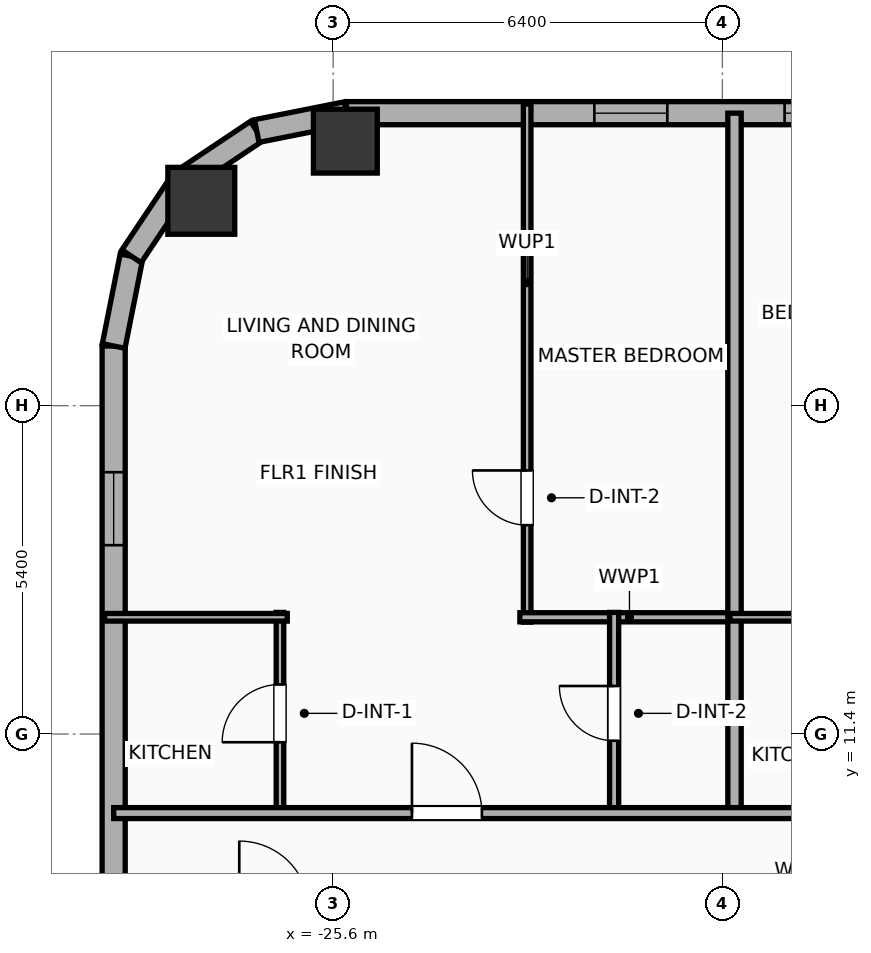
"""IFC4 building model, lengths in metres.
Left out: names, types, materials, properties, quantities, classifications, styles, units other than length and angle.
Written with IfcOpenShell. Run it as: python <this file> out.ifc"""

import sys

from ifc_helpers import new_model, si_unit, direction, frame, frame_2d, origin, origin_2d, place, context, subcontext, project, spatial, rectangle, hollow_rectangle, hollow_circle, extrude, element, fill, save


model = new_model("IFC4")
c1 = context("Model", 3, precision=1e-05, world=origin(), true_north=direction((0.0, 1.0)))
c2 = subcontext(c1, "Body", "Model", "MODEL_VIEW")
j1 = project(units=[si_unit("LENGTHUNIT", "METRE"), si_unit("PLANEANGLEUNIT", "RADIAN")], contexts=[c1])
p1 = place(None, origin())
s1 = spatial("IfcSite", under=j1, at=p1, CompositionType="ELEMENT")
p2 = place(p1, origin())
s2 = spatial("IfcBuilding", under=s1, at=p2, CompositionType="ELEMENT")
p3 = place(p2, frame((0.0, 0.0, 101.4)))
s3 = spatial("IfcBuildingStorey", under=s2, at=p3, CompositionType="ELEMENT", Elevation=101.4)
p4 = place(p3, frame((-25.4, 21.15, 0.0), z_axis=(0.0, 0.0, 1.0), x_axis=(1.0, 0.0, 0.0)))
e1 = element("IfcColumn", 1, at=p4, inside=s3, PredefinedType="COLUMN", context=c2, shape_type="SweptSolid", body=[
    extrude(hollow_rectangle(XDim=1.05, YDim=1.05, WallThickness=0.036, at=origin_2d()), origin(), (0.0, 0.0, 1.0), 3.9),
])
p5 = place(p3, frame((-27.769, 20.169, 0.0), z_axis=(0.0, 0.0, 1.0), x_axis=(1.0, 0.0, 0.0)))
e2 = element("IfcColumn", 2, at=p5, inside=s3, PredefinedType="COLUMN", context=c2, shape_type="SweptSolid", body=[
    extrude(hollow_circle(Radius=0.55, WallThickness=0.036, at=origin_2d()), origin(), (0.0, 0.0, 1.0), 3.9),
])
p6 = place(p3, frame((-29.21, -16.581, 0.0), z_axis=(0.0, 0.0, 1.0), x_axis=(0.0, 1.0, 0.0)))
e3 = element("IfcWall", 3, at=p6, inside=s3, PredefinedType="ELEMENTEDWALL", context=c2, shape_type="SweptSolid", body=[
    extrude(rectangle(XDim=34.363, YDim=0.38, at=frame_2d((17.181, 0.0))), origin(), (0.0, 0.0, 1.0), 3.65),
])
p7 = place(p6, frame((31.087, 0.0, 0.75)))
e4 = element("IfcOpeningElement", 4, at=p7, cuts=e3, PredefinedType="OPENING", context=c2, shape_type="SweptSolid", body=[
    extrude(rectangle(XDim=1.2, YDim=2.05, at=frame_2d((0.6, 1.025))), frame((0.0, 0.2, 0.0), z_axis=(0.0, -1.0, 0.0), x_axis=(1.0, 0.0, 0.0)), (0.0, 0.0, 1.0), 0.4),
])
p8 = place(p6, frame((21.626, 0.0, 0.75)))
e5 = element("IfcOpeningElement", 5, at=p8, cuts=e3, PredefinedType="OPENING", context=c2, shape_type="SweptSolid", body=[
    extrude(rectangle(XDim=1.2, YDim=2.05, at=frame_2d((0.6, 1.025))), frame((0.0, 0.2, 0.0), z_axis=(0.0, -1.0, 0.0), x_axis=(1.0, 0.0, 0.0)), (0.0, 0.0, 1.0), 0.4),
])
p9 = place(p6, frame((10.551, 0.0, 0.75)))
e6 = element("IfcOpeningElement", 6, at=p9, cuts=e3, PredefinedType="OPENING", context=c2, shape_type="SweptSolid", body=[
    extrude(rectangle(XDim=1.2, YDim=2.05, at=frame_2d((0.6, 1.025))), frame((0.0, 0.2, 0.0), z_axis=(0.0, -1.0, 0.0), x_axis=(1.0, 0.0, 0.0)), (0.0, 0.0, 1.0), 0.4),
])
p10 = place(p3, frame((-29.21, 17.781, 0.0), z_axis=(0.0, 0.0, 1.0), x_axis=(0.195086038585, 0.980786132421, 0.0)))
e7 = element("IfcWall", 7, at=p10, inside=s3, PredefinedType="ELEMENTEDWALL", context=c2, shape_type="SweptSolid", body=[
    extrude(rectangle(XDim=1.504, YDim=0.38, at=frame_2d((0.752, 0.0))), origin(), (0.0, 0.0, 1.0), 3.65),
])
p11 = place(p3, frame((-28.917, 19.257, 0.0), z_axis=(0.0, 0.0, 1.0), x_axis=(0.555610286119, 0.831442848281, 0.0)))
e8 = element("IfcWall", 8, at=p11, inside=s3, PredefinedType="ELEMENTEDWALL", context=c2, shape_type="SweptSolid", body=[
    extrude(rectangle(XDim=1.485, YDim=0.38, at=frame_2d((0.743, 0.0))), origin(), (0.0, 0.0, 1.0), 3.65),
])
p12 = place(p3, frame((-28.091, 20.491, 0.0), z_axis=(0.0, 0.0, 1.0), x_axis=(0.831468045563, 0.555572577804, 0.0)))
e9 = element("IfcWall", 9, at=p12, inside=s3, PredefinedType="ELEMENTEDWALL", context=c2, shape_type="SweptSolid", body=[
    extrude(rectangle(XDim=1.485, YDim=0.38, at=frame_2d((0.742, 0.0))), origin(), (0.0, 0.0, 1.0), 3.65),
])
p13 = place(p3, frame((-26.857, 21.316, 0.0), z_axis=(0.0, 0.0, 1.0), x_axis=(0.980755066645, 0.195242155415, 0.0)))
e10 = element("IfcWall", 10, at=p13, inside=s3, PredefinedType="ELEMENTEDWALL", context=c2, shape_type="SweptSolid", body=[
    extrude(rectangle(XDim=1.504, YDim=0.38, at=frame_2d((0.752, 0.0))), origin(), (0.0, 0.0, 1.0), 3.65),
])
p14 = place(p3, frame((-25.381, 21.61, 0.0), z_axis=(0.0, 0.0, 1.0), x_axis=(1.0, 0.0, 0.0)))
e11 = element("IfcWall", 11, at=p14, inside=s3, PredefinedType="ELEMENTEDWALL", context=c2, shape_type="SweptSolid", body=[
    extrude(rectangle(XDim=54.763, YDim=0.38, at=frame_2d((27.381, 0.0))), origin(), (0.0, 0.0, 1.0), 3.65),
])
p15 = place(p14, frame((45.067, 0.0, 0.75)))
e12 = element("IfcOpeningElement", 12, at=p15, cuts=e11, PredefinedType="OPENING", context=c2, shape_type="SweptSolid", body=[
    extrude(rectangle(XDim=2.4, YDim=2.1, at=frame_2d((1.2, 1.05))), frame((0.0, 0.2, 0.0), z_axis=(0.0, -1.0, 0.0), x_axis=(1.0, 0.0, 0.0)), (0.0, 0.0, 1.0), 0.4),
])
p16 = place(p14, frame((4.076, 0.0, 0.75)))
e13 = element("IfcOpeningElement", 13, at=p16, cuts=e11, PredefinedType="OPENING", context=c2, shape_type="SweptSolid", body=[
    extrude(rectangle(XDim=1.2, YDim=2.05, at=frame_2d((0.6, 1.025))), frame((0.0, 0.2, 0.0), z_axis=(0.0, -1.0, 0.0), x_axis=(1.0, 0.0, 0.0)), (0.0, 0.0, 1.0), 0.4),
])
p17 = place(p14, frame((9.395, 0.0, 0.75)))
e14 = element("IfcOpeningElement", 14, at=p17, cuts=e11, PredefinedType="OPENING", context=c2, shape_type="SweptSolid", body=[
    extrude(rectangle(XDim=0.85, YDim=2.05, at=frame_2d((0.425, 1.025))), frame((0.0, 0.2, 0.0), z_axis=(0.0, -1.0, 0.0), x_axis=(1.0, 0.0, 0.0)), (0.0, 0.0, 1.0), 0.4),
])
p18 = place(p14, frame((7.205, 0.0, 0.75)))
e15 = element("IfcOpeningElement", 15, at=p18, cuts=e11, PredefinedType="OPENING", context=c2, shape_type="SweptSolid", body=[
    extrude(rectangle(XDim=1.2, YDim=2.05, at=frame_2d((0.6, 1.025))), frame((0.0, 0.2, 0.0), z_axis=(0.0, -1.0, 0.0), x_axis=(1.0, 0.0, 0.0)), (0.0, 0.0, 1.0), 0.4),
])
p19 = place(p14, frame((13.676, 0.0, 0.75)))
e16 = element("IfcOpeningElement", 16, at=p19, cuts=e11, PredefinedType="OPENING", context=c2, shape_type="SweptSolid", body=[
    extrude(rectangle(XDim=1.2, YDim=2.05, at=frame_2d((0.6, 1.025))), frame((0.0, 0.2, 0.0), z_axis=(0.0, -1.0, 0.0), x_axis=(1.0, 0.0, 0.0)), (0.0, 0.0, 1.0), 0.4),
])
p20 = place(p14, frame((17.136, 0.0, 0.75)))
e17 = element("IfcOpeningElement", 17, at=p20, cuts=e11, PredefinedType="OPENING", context=c2, shape_type="SweptSolid", body=[
    extrude(rectangle(XDim=1.2, YDim=2.05, at=frame_2d((0.6, 1.025))), frame((0.0, 0.2, 0.0), z_axis=(0.0, -1.0, 0.0), x_axis=(1.0, 0.0, 0.0)), (0.0, 0.0, 1.0), 0.4),
])
p21 = place(p14, frame((22.656, 0.0, 0.75)))
e18 = element("IfcOpeningElement", 18, at=p21, cuts=e11, PredefinedType="OPENING", context=c2, shape_type="SweptSolid", body=[
    extrude(rectangle(XDim=1.2, YDim=2.05, at=frame_2d((0.6, 1.025))), frame((0.0, 0.2, 0.0), z_axis=(0.0, -1.0, 0.0), x_axis=(1.0, 0.0, 0.0)), (0.0, 0.0, 1.0), 0.4),
])
p22 = place(p14, frame((29.443, 0.0, 0.75)))
e19 = element("IfcOpeningElement", 19, at=p22, cuts=e11, PredefinedType="OPENING", context=c2, shape_type="SweptSolid", body=[
    extrude(rectangle(XDim=1.2, YDim=2.05, at=frame_2d((0.6, 1.025))), frame((0.0, 0.2, 0.0), z_axis=(0.0, -1.0, 0.0), x_axis=(1.0, 0.0, 0.0)), (0.0, 0.0, 1.0), 0.4),
])
p23 = place(p14, frame((26.348, 0.0, 0.75)))
e20 = element("IfcOpeningElement", 20, at=p23, cuts=e11, PredefinedType="OPENING", context=c2, shape_type="SweptSolid", body=[
    extrude(rectangle(XDim=1.2, YDim=2.05, at=frame_2d((0.6, 1.025))), frame((0.0, 0.2, 0.0), z_axis=(0.0, -1.0, 0.0), x_axis=(1.0, 0.0, 0.0)), (0.0, 0.0, 1.0), 0.4),
])
p24 = place(p14, frame((33.596, 0.0, 0.75)))
e21 = element("IfcOpeningElement", 21, at=p24, cuts=e11, PredefinedType="OPENING", context=c2, shape_type="SweptSolid", body=[
    extrude(rectangle(XDim=1.2, YDim=2.05, at=frame_2d((0.6, 1.025))), frame((0.0, 0.2, 0.0), z_axis=(0.0, -1.0, 0.0), x_axis=(1.0, 0.0, 0.0)), (0.0, 0.0, 1.0), 0.4),
])
p25 = place(p14, frame((36.014, 0.0, 0.75)))
e22 = element("IfcOpeningElement", 22, at=p25, cuts=e11, PredefinedType="OPENING", context=c2, shape_type="SweptSolid", body=[
    extrude(rectangle(XDim=1.2, YDim=2.05, at=frame_2d((0.6, 1.025))), frame((0.0, 0.2, 0.0), z_axis=(0.0, -1.0, 0.0), x_axis=(1.0, 0.0, 0.0)), (0.0, 0.0, 1.0), 0.4),
])
p26 = place(p14, frame((40.814, 0.0, 0.75)))
e23 = element("IfcOpeningElement", 23, at=p26, cuts=e11, PredefinedType="OPENING", context=c2, shape_type="SweptSolid", body=[
    extrude(rectangle(XDim=1.2, YDim=2.05, at=frame_2d((0.6, 1.025))), frame((0.0, 0.2, 0.0), z_axis=(0.0, -1.0, 0.0), x_axis=(1.0, 0.0, 0.0)), (0.0, 0.0, 1.0), 0.4),
])
p27 = place(p14, frame((49.385, 0.0, 0.75)))
e24 = element("IfcOpeningElement", 24, at=p27, cuts=e11, PredefinedType="OPENING", context=c2, shape_type="SweptSolid", body=[
    extrude(rectangle(XDim=1.2, YDim=2.05, at=frame_2d((0.6, 1.025))), frame((0.0, 0.2, 0.0), z_axis=(0.0, -1.0, 0.0), x_axis=(1.0, 0.0, 0.0)), (0.0, 0.0, 1.0), 0.4),
])
p28 = place(p14, frame((52.181, 0.0, 0.75)))
e25 = element("IfcOpeningElement", 25, at=p28, cuts=e11, PredefinedType="OPENING", context=c2, shape_type="SweptSolid", body=[
    extrude(rectangle(XDim=1.2, YDim=2.05, at=frame_2d((0.6, 1.025))), frame((0.0, 0.2, 0.0), z_axis=(0.0, -1.0, 0.0), x_axis=(1.0, 0.0, 0.0)), (0.0, 0.0, 1.0), 0.4),
])
p29 = place(p3, frame((-22.41, 13.24, 0.0), z_axis=(0.0, 0.0, 1.0), x_axis=(0.0, 1.0, 0.0)))
e26 = element("IfcWall", 26, at=p29, inside=s3, PredefinedType="PARTITIONING", context=c2, shape_type="SweptSolid", body=[
    extrude(rectangle(XDim=8.52, YDim=0.125, at=frame_2d((4.26, 0.0))), origin(), (0.0, 0.0, 1.0), 3.65),
])
p30 = place(p29, frame((1.595, 0.0, 0.0)))
e27 = element("IfcOpeningElement", 27, at=p30, cuts=e26, PredefinedType="OPENING", context=c2, shape_type="SweptSolid", body=[
    extrude(rectangle(XDim=0.9, YDim=2.05, at=frame_2d((0.45, 1.025))), frame((0.0, 0.073, 0.0), z_axis=(0.0, -1.0, 0.0), x_axis=(1.0, 0.0, 0.0)), (0.0, 0.0, 1.0), 0.145),
])
p31 = place(p3, frame((-22.53, 13.32, 0.0), z_axis=(0.0, 0.0, 1.0), x_axis=(1.0, 0.0, 0.0)))
e28 = element("IfcWall", 28, at=p31, inside=s3, PredefinedType="PLUMBINGWALL", context=c2, shape_type="SweptSolid", body=[
    extrude(rectangle(XDim=3.605, YDim=0.15, at=frame_2d((1.802, 0.0))), origin(), (0.0, 0.0, 1.0), 3.65),
])
p32 = place(p3, frame((-26.475, 10.08, 0.0), z_axis=(0.0, 0.0, 1.0), x_axis=(0.0, 1.0, 0.0)))
e29 = element("IfcWall", 29, at=p32, inside=s3, PredefinedType="PARTITIONING", context=c2, shape_type="SweptSolid", body=[
    extrude(rectangle(XDim=3.32, YDim=0.125, at=frame_2d((1.66, 0.0))), origin(), (0.0, 0.0, 1.0), 3.65),
])
p33 = place(p32, frame((1.185, 0.0, 0.0)))
e30 = element("IfcOpeningElement", 30, at=p33, cuts=e29, PredefinedType="OPENING", context=c2, shape_type="SweptSolid", body=[
    extrude(rectangle(XDim=0.95, YDim=2.05, at=frame_2d((0.475, 1.025))), frame((0.0, 0.073, 0.0), z_axis=(0.0, -1.0, 0.0), x_axis=(1.0, 0.0, 0.0)), (0.0, 0.0, 1.0), 0.145),
])
p34 = place(p3, frame((-29.36, 13.32, 0.0), z_axis=(0.0, 0.0, 1.0), x_axis=(1.0, 0.0, 0.0)))
e31 = element("IfcWall", 31, at=p34, inside=s3, PredefinedType="PARTITIONING", context=c2, shape_type="SweptSolid", body=[
    extrude(rectangle(XDim=3.005, YDim=0.125, at=frame_2d((1.502, 0.0))), origin(), (0.0, 0.0, 1.0), 3.65),
])
p35 = place(p3, frame((-20.98, 10.08, 0.0), z_axis=(0.0, 0.0, 1.0), x_axis=(0.0, 1.0, 0.0)))
e32 = element("IfcWall", 32, at=p35, inside=s3, PredefinedType="PLUMBINGWALL", context=c2, shape_type="SweptSolid", body=[
    extrude(rectangle(XDim=3.32, YDim=0.15, at=frame_2d((1.66, 0.0))), origin(), (0.0, 0.0, 1.0), 3.65),
])
p36 = place(p35, frame((1.21, 0.0, 0.0)))
e33 = element("IfcOpeningElement", 33, at=p36, cuts=e32, PredefinedType="OPENING", context=c2, shape_type="SweptSolid", body=[
    extrude(rectangle(XDim=0.9, YDim=2.05, at=frame_2d((0.45, 1.025))), frame((0.0, 0.085, 0.0), z_axis=(0.0, -1.0, 0.0), x_axis=(1.0, 0.0, 0.0)), (0.0, 0.0, 1.0), 0.17),
])
p37 = place(p3, frame((-19.0, 10.02, 0.0), z_axis=(0.0, 0.0, 1.0), x_axis=(0.0, 1.0, 0.0)))
e34 = element("IfcWall", 34, at=p37, inside=s3, PredefinedType="PARTITIONING", context=c2, shape_type="SweptSolid", body=[
    extrude(rectangle(XDim=11.59, YDim=0.22, at=frame_2d((5.795, 0.0))), origin(), (0.0, 0.0, 1.0), 3.65),
])
p38 = place(p3, frame((-19.075, 13.32, 0.0), z_axis=(0.0, 0.0, 1.0), x_axis=(1.0, 0.0, 0.0)))
e35 = element("IfcWall", 35, at=p38, inside=s3, PredefinedType="PARTITIONING", context=c2, shape_type="SweptSolid", body=[
    extrude(rectangle(XDim=3.042, YDim=0.125, at=frame_2d((1.521, 0.0))), origin(), (0.0, 0.0, 1.0), 3.65),
])
p39 = place(p3, frame((-29.21, 10.1, 0.0), z_axis=(0.0, 0.0, 1.0), x_axis=(1.0, 0.0, 0.0)))
e36 = element("IfcWall", 36, at=p39, inside=s3, PredefinedType="PARTITIONING", context=c2, shape_type="SweptSolid", body=[
    extrude(rectangle(XDim=62.42, YDim=0.18, at=frame_2d((31.21, 0.0))), origin(), (0.0, 0.0, 1.0), 3.65),
])
p40 = place(p39, frame((4.906, 0.0, 0.0)))
e37 = element("IfcOpeningElement", 37, at=p40, cuts=e36, PredefinedType="OPENING", context=c2, shape_type="SweptSolid", body=[
    extrude(rectangle(XDim=1.15, YDim=2.05, at=frame_2d((0.575, 1.025))), frame((0.0, 0.1, 0.0), z_axis=(0.0, -1.0, 0.0), x_axis=(1.0, 0.0, 0.0)), (0.0, 0.0, 1.0), 0.2),
])
p41 = place(p39, frame((14.812, 0.0, 0.0)))
e38 = element("IfcOpeningElement", 38, at=p41, cuts=e36, PredefinedType="OPENING", context=c2, shape_type="SweptSolid", body=[
    extrude(rectangle(XDim=1.15, YDim=2.05, at=frame_2d((0.575, 1.025))), frame((0.0, 0.1, 0.0), z_axis=(0.0, -1.0, 0.0), x_axis=(1.0, 0.0, 0.0)), (0.0, 0.0, 1.0), 0.2),
])
p42 = place(p39, frame((24.406, 0.0, 0.0)))
e39 = element("IfcOpeningElement", 39, at=p42, cuts=e36, PredefinedType="OPENING", context=c2, shape_type="SweptSolid", body=[
    extrude(rectangle(XDim=1.15, YDim=2.05, at=frame_2d((0.575, 1.025))), frame((0.0, 0.1, 0.0), z_axis=(0.0, -1.0, 0.0), x_axis=(1.0, 0.0, 0.0)), (0.0, 0.0, 1.0), 0.2),
])
p43 = place(p39, frame((33.981, 0.0, 0.0)))
e40 = element("IfcOpeningElement", 40, at=p43, cuts=e36, PredefinedType="OPENING", context=c2, shape_type="SweptSolid", body=[
    extrude(rectangle(XDim=1.15, YDim=2.05, at=frame_2d((0.575, 1.025))), frame((0.0, 0.1, 0.0), z_axis=(0.0, -1.0, 0.0), x_axis=(1.0, 0.0, 0.0)), (0.0, 0.0, 1.0), 0.2),
])
p44 = place(p39, frame((43.138, 0.0, 0.0)))
e41 = element("IfcOpeningElement", 41, at=p44, cuts=e36, PredefinedType="OPENING", context=c2, shape_type="SweptSolid", body=[
    extrude(rectangle(XDim=1.15, YDim=2.05, at=frame_2d((0.575, 1.025))), frame((0.0, 0.1, 0.0), z_axis=(0.0, -1.0, 0.0), x_axis=(1.0, 0.0, 0.0)), (0.0, 0.0, 1.0), 0.2),
])
p45 = place(p39, frame((51.777, 0.0, 0.0)))
e42 = element("IfcOpeningElement", 42, at=p45, cuts=e36, PredefinedType="OPENING", context=c2, shape_type="SweptSolid", body=[
    extrude(rectangle(XDim=0.9, YDim=2.05, at=frame_2d((0.45, 1.025))), frame((0.0, 0.1, 0.0), z_axis=(0.0, -1.0, 0.0), x_axis=(1.0, 0.0, 0.0)), (0.0, 0.0, 1.0), 0.2),
])
p46 = place(p39, frame((58.718, 0.0, 0.0)))
e43 = element("IfcOpeningElement", 43, at=p46, cuts=e36, PredefinedType="OPENING", context=c2, shape_type="SweptSolid", body=[
    extrude(rectangle(XDim=0.9, YDim=2.05, at=frame_2d((0.45, 1.025))), frame((0.0, 0.1, 0.0), z_axis=(0.0, -1.0, 0.0), x_axis=(1.0, 0.0, 0.0)), (0.0, 0.0, 1.0), 0.2),
])
p47 = place(p7, origin())
e44 = element("IfcWindow", 44, at=p47, inside=s3, PartitioningType="SINGLE_PANEL", PredefinedType="WINDOW", context=c2, shape_type="SweptSolid", body=[
    extrude(rectangle(XDim=1.2, YDim=2.05, at=frame_2d((0.6, 1.025))), frame((0.0, 0.03, 0.0), z_axis=(0.0, -1.0, 0.0), x_axis=(1.0, 0.0, 0.0)), (0.0, 0.0, 1.0), 0.06),
])
fill(e4, e44)
p48 = place(p16, origin())
e45 = element("IfcWindow", 45, at=p48, inside=s3, PartitioningType="SINGLE_PANEL", PredefinedType="WINDOW", context=c2, shape_type="SweptSolid", body=[
    extrude(rectangle(XDim=1.2, YDim=2.05, at=frame_2d((0.6, 1.025))), frame((0.0, 0.03, 0.0), z_axis=(0.0, -1.0, 0.0), x_axis=(1.0, 0.0, 0.0)), (0.0, 0.0, 1.0), 0.06),
])
fill(e13, e45)
p49 = place(p18, origin())
e46 = element("IfcWindow", 46, at=p49, inside=s3, PartitioningType="SINGLE_PANEL", PredefinedType="WINDOW", context=c2, shape_type="SweptSolid", body=[
    extrude(rectangle(XDim=1.2, YDim=2.05, at=frame_2d((0.6, 1.025))), frame((0.0, 0.03, 0.0), z_axis=(0.0, -1.0, 0.0), x_axis=(1.0, 0.0, 0.0)), (0.0, 0.0, 1.0), 0.06),
])
fill(e15, e46)
p50 = place(p30, origin())
e47 = element("IfcDoor", 47, at=p50, inside=s3, OperationType="SINGLE_SWING_RIGHT", PredefinedType="DOOR", context=c2, shape_type="SweptSolid", body=[
    extrude(rectangle(XDim=0.9, YDim=2.05, at=frame_2d((0.45, 1.025))), frame((0.0, 0.025, 0.0), z_axis=(0.0, -1.0, 0.0), x_axis=(1.0, 0.0, 0.0)), (0.0, 0.0, 1.0), 0.05),
])
fill(e27, e47)
p51 = place(p33, origin())
e48 = element("IfcDoor", 48, at=p51, inside=s3, OperationType="SINGLE_SWING_LEFT", PredefinedType="DOOR", context=c2, shape_type="SweptSolid", body=[
    extrude(rectangle(XDim=0.95, YDim=2.05, at=frame_2d((0.475, 1.025))), frame((0.0, 0.025, 0.0), z_axis=(0.0, -1.0, 0.0), x_axis=(1.0, 0.0, 0.0)), (0.0, 0.0, 1.0), 0.05),
])
fill(e30, e48)
p52 = place(p36, origin())
e49 = element("IfcDoor", 49, at=p52, inside=s3, OperationType="SINGLE_SWING_RIGHT", PredefinedType="DOOR", context=c2, shape_type="SweptSolid", body=[
    extrude(rectangle(XDim=0.9, YDim=2.05, at=frame_2d((0.45, 1.025))), frame((0.0, 0.025, 0.0), z_axis=(0.0, -1.0, 0.0), x_axis=(1.0, 0.0, 0.0)), (0.0, 0.0, 1.0), 0.05),
])
fill(e33, e49)
p53 = place(p40, origin())
e50 = element("IfcDoor", 50, at=p53, inside=s3, OperationType="SINGLE_SWING_LEFT", PredefinedType="DOOR", context=c2, shape_type="SweptSolid", body=[
    extrude(rectangle(XDim=1.15, YDim=2.05, at=frame_2d((0.575, 1.025))), frame((0.0, 0.025, 0.0), z_axis=(0.0, -1.0, 0.0), x_axis=(1.0, 0.0, 0.0)), (0.0, 0.0, 1.0), 0.05),
])
fill(e37, e50)
save(model, sys.argv[1])
